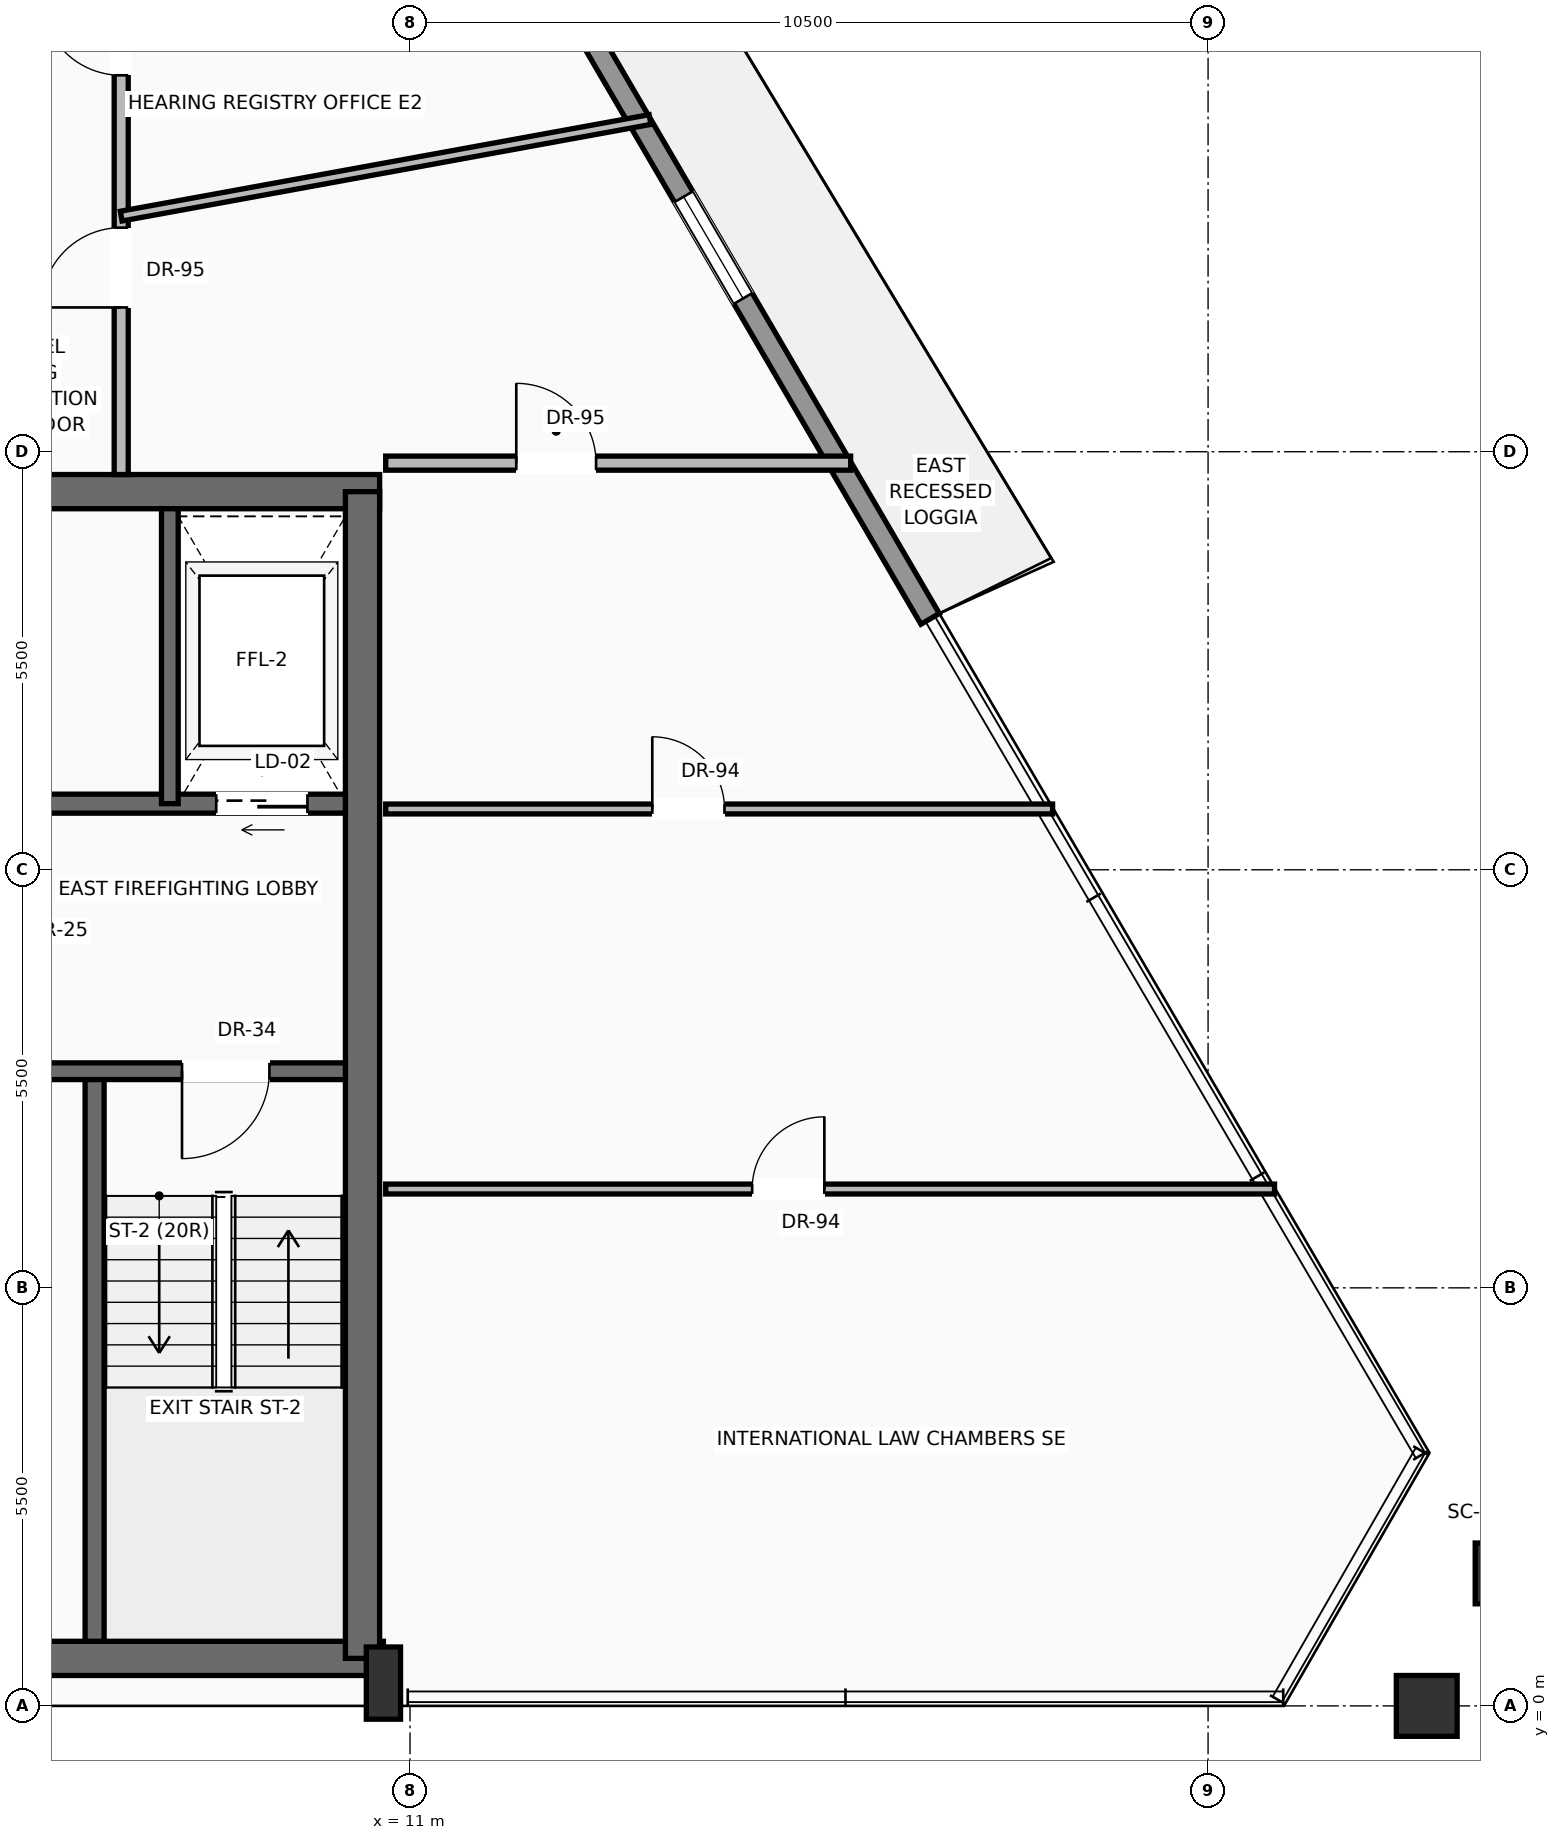
"""IFC4 building model, lengths in metres.
Left out: names, types, materials, properties, quantities, classifications, styles, units other than length and angle.
Written with IfcOpenShell. Run it as: python <this file> out.ifc"""

import sys

from ifc_helpers import new_model, si_unit, direction, frame, frame_2d, origin, origin_2d, place, context, subcontext, project, spatial, rectangle, hollow_rectangle, extrude, source, transform, mapped, element, fill, save


model = new_model("IFC4")
c1 = context("Model", 3, precision=1e-05, world=origin(), true_north=direction((0.0, 1.0)))
c2 = subcontext(c1, "Body", "Model", "MODEL_VIEW")
j1 = project(units=[si_unit("LENGTHUNIT", "METRE"), si_unit("PLANEANGLEUNIT", "RADIAN")], contexts=[c1])
p1 = place(None, origin())
s1 = spatial("IfcSite", under=j1, at=p1, CompositionType="ELEMENT")
p2 = place(p1, origin())
s2 = spatial("IfcBuilding", under=s1, at=p2, CompositionType="ELEMENT")
p3 = place(p2, frame((0.0, 0.0, 286.8)))
s3 = spatial("IfcBuildingStorey", under=s2, at=p3, CompositionType="ELEMENT", Elevation=286.8)
p4 = place(p3, frame((-10.65, 0.625, 0.0), z_axis=(0.0, 0.0, 1.0), x_axis=(1.0, 0.0, 0.0)))
e1 = element("IfcWall", 1, at=p4, inside=s3, PredefinedType="SHEAR", context=c2, shape_type="SweptSolid", body=[
    extrude(rectangle(XDim=21.3, YDim=0.45, at=frame_2d((10.65, 0.0))), origin(), (0.0, 0.0, 1.0), 3.24),
])
p5 = place(p3, frame((-10.6, 15.975, 0.0), z_axis=(0.0, 0.0, 1.0), x_axis=(1.0, 0.0, 0.0)))
e2 = element("IfcWall", 2, at=p5, inside=s3, PredefinedType="SHEAR", context=c2, shape_type="SweptSolid", body=[
    extrude(rectangle(XDim=21.2, YDim=0.45, at=frame_2d((10.6, 0.0))), origin(), (0.0, 0.0, 1.0), 3.24),
])
p6 = place(p5, frame((3.17, 0.0, 0.0)))
e3 = element("IfcOpeningElement", 3, at=p6, cuts=e2, PredefinedType="OPENING", context=c2, shape_type="SweptSolid", body=[
    extrude(rectangle(XDim=1.3, YDim=2.3, at=frame_2d((0.65, 1.15))), frame((0.0, 0.235, 0.0), z_axis=(0.0, -1.0, 0.0), x_axis=(1.0, 0.0, 0.0)), (0.0, 0.0, 1.0), 0.47),
])
p7 = place(p5, frame((9.6, 0.0, 0.0)))
e4 = element("IfcOpeningElement", 4, at=p7, cuts=e2, PredefinedType="OPENING", context=c2, shape_type="SweptSolid", body=[
    extrude(rectangle(XDim=2.0, YDim=2.4, at=frame_2d((1.0, 1.2))), frame((0.0, 0.235, 0.0), z_axis=(0.0, -1.0, 0.0), x_axis=(1.0, 0.0, 0.0)), (0.0, 0.0, 1.0), 0.47),
])
p8 = place(p3, frame((10.375, 0.625, 0.0), z_axis=(0.0, 0.0, 1.0), x_axis=(0.0, 1.0, 0.0)))
e5 = element("IfcWall", 5, at=p8, inside=s3, PredefinedType="SHEAR", context=c2, shape_type="SweptSolid", body=[
    extrude(rectangle(XDim=15.35, YDim=0.45, at=frame_2d((7.675, 0.0))), origin(), (0.0, 0.0, 1.0), 3.24),
])
m1 = source(origin(), c2, "Body", "SweptSolid", [
    extrude(rectangle(XDim=0.45, YDim=0.95, at=origin_2d()), origin(), (0.0, 0.0, 1.0), 3.45),
])
p9 = place(p3, frame((10.65, 0.3, 0.0), z_axis=(0.0, 0.0, 1.0), x_axis=(1.0, 0.0, 0.0)))
e6 = element("IfcColumn", 6, at=p9, inside=s3, PredefinedType="PILASTER", context=c2, shape_type="MappedRepresentation", body=[
    mapped(m1, transform((0.0, 0.0, 0.0), scale=1.0)),
])
m2 = source(origin(), c2, "Body", "SweptSolid", [
    extrude(hollow_rectangle(XDim=0.8, YDim=0.8, WallThickness=0.04, at=origin_2d()), origin(), (0.0, 0.0, 1.0), 3.441),
])
p10 = place(p3, frame((24.377, 0.0, 0.004), z_axis=(-0.003831117681, 0.0, 0.999992661242), x_axis=(0.0, -1.0, 0.0)))
e7 = element("IfcColumn", 7, at=p10, inside=s3, PredefinedType="COLUMN", context=c2, shape_type="MappedRepresentation", body=[
    mapped(m2, transform((0.0, 0.0, 0.0), scale=1.0)),
])
m3 = source(origin(), c2, "Body", "SweptSolid", [
    extrude(hollow_rectangle(XDim=0.8, YDim=0.8, WallThickness=0.04, at=origin_2d()), origin(), (0.0, 0.0, 1.0), 3.442),
])
p11 = place(p3, frame((25.415, 1.743, 0.004), z_axis=(-0.013335296847, -0.015392337318, 0.999792601398), x_axis=(0.75580399141, -0.654797928042, 0.0)))
e8 = element("IfcColumn", 8, at=p11, inside=s3, PredefinedType="COLUMN", context=c2, shape_type="MappedRepresentation", body=[
    mapped(m3, transform((0.0, 0.0, 0.0), scale=1.0)),
])
p12 = place(p3, frame((7.708, 31.656, 0.0), z_axis=(0.0, 0.0, 1.0), x_axis=(0.504292445958, -0.86353293449, 0.0)))
e9 = element("IfcWall", 9, at=p12, inside=s3, PredefinedType="SOLIDWALL", context=c2, shape_type="SweptSolid", body=[
    extrude(rectangle(XDim=20.096, YDim=0.28, at=frame_2d((10.048, 0.0))), origin(), (0.0, 0.0, 1.0), 2.82),
])
p13 = place(p12, frame((4.823, 0.0, 0.0)))
e10 = element("IfcOpeningElement", 10, at=p13, cuts=e9, PredefinedType="OPENING", context=c2, shape_type="SweptSolid", body=[
    extrude(rectangle(XDim=1.6, YDim=2.35, at=frame_2d((0.8, 1.175))), frame((0.0, 0.15, 0.0), z_axis=(0.0, -1.0, 0.0), x_axis=(1.0, 0.0, 0.0)), (0.0, 0.0, 1.0), 0.3),
])
p14 = place(p12, frame((13.666, 0.0, 0.9)))
e11 = element("IfcOpeningElement", 11, at=p14, cuts=e9, PredefinedType="OPENING", context=c2, shape_type="SweptSolid", body=[
    extrude(rectangle(XDim=1.55, YDim=1.75, at=frame_2d((0.775, 0.875))), frame((0.0, 0.15, 0.0), z_axis=(0.0, -1.0, 0.0), x_axis=(1.0, 0.0, 0.0)), (0.0, 0.0, 1.0), 0.3),
])
p15 = place(p3, frame((6.85, 0.85, 0.0), z_axis=(0.0, 0.0, 1.0), x_axis=(0.0, 1.0, 0.0)))
e12 = element("IfcWall", 12, at=p15, inside=s3, PredefinedType="SOLIDWALL", context=c2, shape_type="SweptSolid", body=[
    extrude(rectangle(XDim=7.5, YDim=0.25, at=frame_2d((3.75, 0.0))), origin(), (0.0, 0.0, 1.0), 3.24),
])
p16 = place(p3, frame((10.15, 8.35, 0.0), z_axis=(0.0, 0.0, 1.0), x_axis=(-1.0, 0.0, 0.0)))
e13 = element("IfcWall", 13, at=p16, inside=s3, PredefinedType="SOLIDWALL", context=c2, shape_type="SweptSolid", body=[
    extrude(rectangle(XDim=4.65, YDim=0.22, at=frame_2d((2.325, 0.0))), origin(), (0.0, 0.0, 1.0), 3.24),
])
p17 = place(p16, frame((1.0, 0.0, 0.0)))
e14 = element("IfcOpeningElement", 14, at=p17, cuts=e13, PredefinedType="OPENING", context=c2, shape_type="SweptSolid", body=[
    extrude(rectangle(XDim=1.15, YDim=2.2, at=frame_2d((0.575, 1.1))), frame((0.0, 0.12, 0.0), z_axis=(0.0, -1.0, 0.0), x_axis=(1.0, 0.0, 0.0)), (0.0, 0.0, 1.0), 0.24),
])
p18 = place(p3, frame((10.15, 11.87, 0.0), z_axis=(0.0, 0.0, 1.0), x_axis=(-1.0, 0.0, 0.0)))
e15 = element("IfcWall", 15, at=p18, inside=s3, PredefinedType="SOLIDWALL", context=c2, shape_type="SweptSolid", body=[
    extrude(rectangle(XDim=4.65, YDim=0.25, at=frame_2d((2.325, 0.0))), origin(), (0.0, 0.0, 1.0), 3.24),
])
p19 = place(p18, frame((0.5, 0.0, 0.0)))
e16 = element("IfcOpeningElement", 16, at=p19, cuts=e15, PredefinedType="OPENING", context=c2, shape_type="SweptSolid", body=[
    extrude(rectangle(XDim=1.2, YDim=2.25, at=frame_2d((0.6, 1.125))), frame((0.0, 0.135, 0.0), z_axis=(0.0, -1.0, 0.0), x_axis=(1.0, 0.0, 0.0)), (0.0, 0.0, 1.0), 0.27),
])
p20 = place(p3, frame((7.84, 11.87, 0.0), z_axis=(0.0, 0.0, 1.0), x_axis=(0.0, 1.0, 0.0)))
e17 = element("IfcWall", 17, at=p20, inside=s3, PredefinedType="SOLIDWALL", context=c2, shape_type="SweptSolid", body=[
    extrude(rectangle(XDim=3.88, YDim=0.22, at=frame_2d((1.94, 0.0))), origin(), (0.0, 0.0, 1.0), 3.24),
])
p21 = place(p3, frame((7.2, 16.2, 0.0), z_axis=(0.0, 0.0, 1.0), x_axis=(0.0, 1.0, 0.0)))
e18 = element("IfcWall", 18, at=p21, inside=s3, PredefinedType="PARTITIONING", context=c2, shape_type="SweptSolid", body=[
    extrude(rectangle(XDim=10.4, YDim=0.185, at=frame_2d((5.2, 0.0))), origin(), (0.0, 0.0, 1.0), 3.232),
])
p22 = place(p21, frame((2.198, 0.0, 0.0)))
e19 = element("IfcOpeningElement", 19, at=p22, cuts=e18, PredefinedType="OPENING", context=c2, shape_type="SweptSolid", body=[
    extrude(rectangle(XDim=1.05, YDim=2.25, at=frame_2d((0.525, 1.125))), frame((0.0, 0.103, 0.0), z_axis=(0.0, -1.0, 0.0), x_axis=(1.0, 0.0, 0.0)), (0.0, 0.0, 1.0), 0.205),
])
p23 = place(p21, frame((5.252, 0.0, 0.0)))
e20 = element("IfcOpeningElement", 20, at=p23, cuts=e18, PredefinedType="OPENING", context=c2, shape_type="SweptSolid", body=[
    extrude(rectangle(XDim=1.05, YDim=2.25, at=frame_2d((0.525, 1.125))), frame((0.0, 0.103, 0.0), z_axis=(0.0, -1.0, 0.0), x_axis=(1.0, 0.0, 0.0)), (0.0, 0.0, 1.0), 0.205),
])
p24 = place(p21, frame((8.369, 0.0, 0.0)))
e21 = element("IfcOpeningElement", 21, at=p24, cuts=e18, PredefinedType="OPENING", context=c2, shape_type="SweptSolid", body=[
    extrude(rectangle(XDim=1.05, YDim=2.25, at=frame_2d((0.525, 1.125))), frame((0.0, 0.103, 0.0), z_axis=(0.0, -1.0, 0.0), x_axis=(1.0, 0.0, 0.0)), (0.0, 0.0, 1.0), 0.205),
])
p25 = place(p3, frame((10.68, 16.35, 0.0), z_axis=(0.0, 0.0, 1.0), x_axis=(1.0, 0.0, 0.0)))
e22 = element("IfcWall", 22, at=p25, inside=s3, PredefinedType="PARTITIONING", context=c2, shape_type="SweptSolid", body=[
    extrude(rectangle(XDim=6.117, YDim=0.185, at=frame_2d((3.059, 0.0))), origin(), (0.0, 0.0, 1.0), 3.232),
])
p26 = place(p25, frame((1.718, 0.0, 0.0)))
e23 = element("IfcOpeningElement", 23, at=p26, cuts=e22, PredefinedType="OPENING", context=c2, shape_type="SweptSolid", body=[
    extrude(rectangle(XDim=1.05, YDim=2.25, at=frame_2d((0.525, 1.125))), frame((0.0, 0.103, 0.0), z_axis=(0.0, -1.0, 0.0), x_axis=(1.0, 0.0, 0.0)), (0.0, 0.0, 1.0), 0.205),
])
p27 = place(p3, frame((10.68, 6.8, 0.0), z_axis=(0.0, 0.0, 1.0), x_axis=(1.0, 0.0, 0.0)))
e24 = element("IfcWall", 24, at=p27, inside=s3, PredefinedType="PARTITIONING", context=c2, shape_type="SweptSolid", body=[
    extrude(rectangle(XDim=11.695, YDim=0.13, at=frame_2d((5.847, 0.0))), origin(), (0.0, 0.0, 1.0), 3.232),
])
p28 = place(p27, frame((4.822, 0.0, 0.0)))
e25 = element("IfcOpeningElement", 25, at=p28, cuts=e24, PredefinedType="OPENING", context=c2, shape_type="SweptSolid", body=[
    extrude(rectangle(XDim=0.95, YDim=2.2, at=frame_2d((0.475, 1.1))), frame((0.0, 0.075, 0.0), z_axis=(0.0, -1.0, 0.0), x_axis=(1.0, 0.0, 0.0)), (0.0, 0.0, 1.0), 0.15),
])
p29 = place(p3, frame((10.68, 11.8, 0.0), z_axis=(0.0, 0.0, 1.0), x_axis=(1.0, 0.0, 0.0)))
e26 = element("IfcWall", 26, at=p29, inside=s3, PredefinedType="PARTITIONING", context=c2, shape_type="SweptSolid", body=[
    extrude(rectangle(XDim=8.774, YDim=0.13, at=frame_2d((4.387, 0.0))), origin(), (0.0, 0.0, 1.0), 3.232),
])
p30 = place(p29, frame((3.508, 0.0, 0.0)))
e27 = element("IfcOpeningElement", 27, at=p30, cuts=e26, PredefinedType="OPENING", context=c2, shape_type="SweptSolid", body=[
    extrude(rectangle(XDim=0.95, YDim=2.2, at=frame_2d((0.475, 1.1))), frame((0.0, 0.075, 0.0), z_axis=(0.0, -1.0, 0.0), x_axis=(1.0, 0.0, 0.0)), (0.0, 0.0, 1.0), 0.15),
])
p31 = place(p3, frame((7.2, 19.6, 0.0), z_axis=(0.0, 0.0, 1.0), x_axis=(0.983744847031, 0.179571924144, 0.0)))
e28 = element("IfcWall", 28, at=p31, inside=s3, PredefinedType="PARTITIONING", context=c2, shape_type="SweptSolid", body=[
    extrude(rectangle(XDim=7.073, YDim=0.13, at=frame_2d((3.536, 0.0))), origin(), (0.0, 0.0, 1.0), 2.885),
])
m4 = source(origin(), c2, "Body", "SweptSolid", [
    extrude(rectangle(XDim=1.55, YDim=1.75, at=frame_2d((0.775, 0.875))), frame((0.0, 0.03, 0.0), z_axis=(0.0, -1.0, 0.0), x_axis=(1.0, 0.0, 0.0)), (0.0, 0.0, 1.0), 0.06),
])
p32 = place(p14, origin())
e29 = element("IfcWindow", 29, at=p32, inside=s3, PartitioningType="SINGLE_PANEL", PredefinedType="WINDOW", context=c2, shape_type="MappedRepresentation", body=[
    mapped(m4, transform((0.0, 0.0, 0.0), scale=1.0)),
])
fill(e11, e29)
m5 = source(origin(), c2, "Body", "SweptSolid", [
    extrude(rectangle(XDim=1.15, YDim=2.2, at=frame_2d((0.575, 1.1))), frame((0.0, 0.025, 0.0), z_axis=(0.0, -1.0, 0.0), x_axis=(1.0, 0.0, 0.0)), (0.0, 0.0, 1.0), 0.05),
])
p33 = place(p17, origin())
e30 = element("IfcDoor", 30, at=p33, inside=s3, OperationType="SINGLE_SWING_RIGHT", PredefinedType="DOOR", context=c2, shape_type="MappedRepresentation", body=[
    mapped(m5, transform((0.0, 0.0, 0.0), scale=1.0)),
])
fill(e14, e30)
m6 = source(origin(), c2, "Body", "SweptSolid", [
    extrude(rectangle(XDim=1.2, YDim=2.25, at=frame_2d((0.6, 1.125))), frame((0.0, 0.025, 0.0), z_axis=(0.0, -1.0, 0.0), x_axis=(1.0, 0.0, 0.0)), (0.0, 0.0, 1.0), 0.05),
])
p34 = place(p19, origin())
e31 = element("IfcDoor", 31, at=p34, inside=s3, OperationType="SLIDING_TO_RIGHT", PredefinedType="DOOR", context=c2, shape_type="MappedRepresentation", body=[
    mapped(m6, transform((0.0, 0.0, 0.0), scale=1.0)),
])
fill(e16, e31)
m7 = source(origin(), c2, "Body", "SweptSolid", [
    extrude(rectangle(XDim=1.05, YDim=2.25, at=frame_2d((0.525, 1.125))), frame((0.0, 0.025, 0.0), z_axis=(0.0, -1.0, 0.0), x_axis=(1.0, 0.0, 0.0)), (0.0, 0.0, 1.0), 0.05),
])
p35 = place(p26, origin())
e32 = element("IfcDoor", 32, at=p35, inside=s3, OperationType="SINGLE_SWING_LEFT", PredefinedType="DOOR", context=c2, shape_type="MappedRepresentation", body=[
    mapped(m7, transform((0.0, 0.0, 0.0), scale=1.0)),
])
fill(e23, e32)
m8 = source(origin(), c2, "Body", "SweptSolid", [
    extrude(rectangle(XDim=0.95, YDim=2.2, at=frame_2d((0.475, 1.1))), frame((0.0, 0.025, 0.0), z_axis=(0.0, -1.0, 0.0), x_axis=(1.0, 0.0, 0.0)), (0.0, 0.0, 1.0), 0.05),
])
p36 = place(p28, origin())
e33 = element("IfcDoor", 33, at=p36, inside=s3, OperationType="SINGLE_SWING_RIGHT", PredefinedType="DOOR", context=c2, shape_type="MappedRepresentation", body=[
    mapped(m8, transform((0.0, 0.0, 0.0), scale=1.0)),
])
fill(e25, e33)
p37 = place(p30, origin())
e34 = element("IfcDoor", 34, at=p37, inside=s3, OperationType="SINGLE_SWING_LEFT", PredefinedType="DOOR", context=c2, shape_type="MappedRepresentation", body=[
    mapped(m8, transform((0.0, 0.0, 0.0), scale=1.0)),
])
fill(e27, e34)
p38 = place(p22, origin())
e35 = element("IfcDoor", 35, at=p38, inside=s3, OperationType="SINGLE_SWING_LEFT", PredefinedType="DOOR", context=c2, shape_type="MappedRepresentation", body=[
    mapped(m7, transform((0.0, 0.0, 0.0), scale=1.0)),
])
fill(e19, e35)
p39 = place(p23, origin())
e36 = element("IfcDoor", 36, at=p39, inside=s3, OperationType="SINGLE_SWING_RIGHT", PredefinedType="DOOR", context=c2, shape_type="MappedRepresentation", body=[
    mapped(m7, transform((0.0, 0.0, 0.0), scale=1.0)),
])
fill(e20, e36)
save(model, sys.argv[1])
